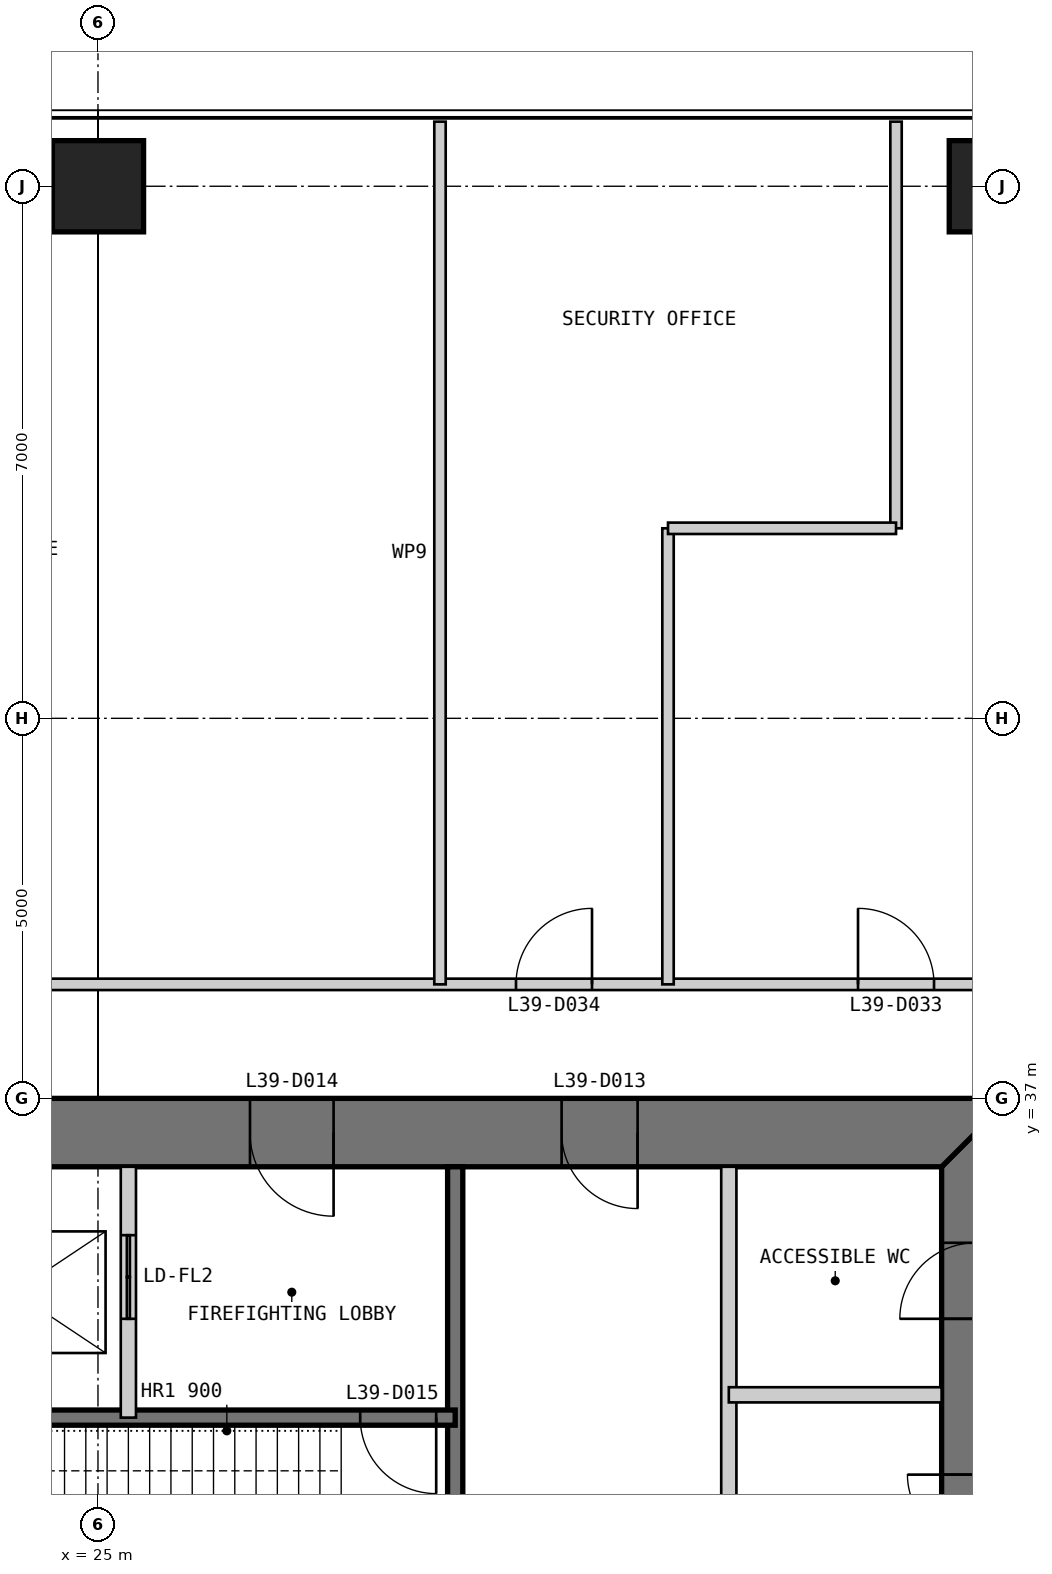
"""IFC4 building model, lengths in metres.
Left out: names, types, materials, properties, quantities, classifications, styles, units other than length and angle.
Written with IfcOpenShell. Run it as: python <this file> out.ifc"""

import sys

from ifc_helpers import new_model, si_unit, direction, frame, frame_2d, origin, origin_2d, place, context, subcontext, project, spatial, polyline, rectangle, outline, extrude, element, fill, save


model = new_model("IFC4")
c1 = context("Model", 3, precision=1e-05, world=origin(), true_north=direction((0.0, 1.0)))
c2 = subcontext(c1, "Body", "Model", "MODEL_VIEW")
j1 = project(units=[si_unit("LENGTHUNIT", "METRE"), si_unit("PLANEANGLEUNIT", "RADIAN")], contexts=[c1])
p1 = place(None, origin())
s1 = spatial("IfcSite", under=j1, at=p1, CompositionType="ELEMENT")
p2 = place(p1, origin())
s2 = spatial("IfcBuilding", under=s1, at=p2, CompositionType="ELEMENT")
p3 = place(p2, frame((0.0, 0.0, 168.4)))
s3 = spatial("IfcBuildingStorey", under=s2, at=p3, CompositionType="ELEMENT", Elevation=168.4)
p4 = place(p3, frame((37.0, 49.0, 0.0), z_axis=(0.0, 0.0, 1.0), x_axis=(1.0, 0.0, 0.0)))
e1 = element("IfcColumn", 1, at=p4, inside=s3, PredefinedType="COLUMN", context=c2, shape_type="SweptSolid", body=[
    extrude(rectangle(XDim=1.6, YDim=1.2, at=origin_2d()), origin(), (0.0, 0.0, 1.0), 5.4),
])
p5 = place(p3, frame((25.0, 49.0, 0.0), z_axis=(0.0, 0.0, 1.0), x_axis=(1.0, 0.0, 0.0)))
e2 = element("IfcColumn", 2, at=p5, inside=s3, PredefinedType="COLUMN", context=c2, shape_type="SweptSolid", body=[
    extrude(rectangle(XDim=1.2, YDim=1.2, at=origin_2d()), origin(), (0.0, 0.0, 1.0), 5.4),
])
p6 = place(p3, frame((36.55, 13.9, 0.0), z_axis=(0.0, 0.0, 1.0), x_axis=(0.0, 1.0, 0.0)))
e3 = element("IfcWall", 3, at=p6, inside=s3, PredefinedType="SHEAR", context=c2, shape_type="SweptSolid", body=[
    extrude(outline(polyline([(-0.9, -0.45), (23.1, -0.45), (22.2, 0.45), (0.0, 0.45), (-0.9, -0.45)])), origin(), (0.0, 0.0, 1.0), 5.4),
])
p7 = place(p6, frame((20.2, 0.0, 0.0)))
e4 = element("IfcOpeningElement", 4, at=p7, cuts=e3, PredefinedType="OPENING", context=c2, shape_type="SweptSolid", body=[
    extrude(rectangle(XDim=1.0, YDim=2.2, at=frame_2d((0.5, 1.1))), frame((0.0, 0.46, 0.0), z_axis=(0.0, -1.0, 0.0), x_axis=(1.0, 0.0, 0.0)), (0.0, 0.0, 1.0), 0.92),
])
p8 = place(p6, frame((17.25, 0.0, 0.0)))
e5 = element("IfcOpeningElement", 5, at=p8, cuts=e3, PredefinedType="OPENING", context=c2, shape_type="SweptSolid", body=[
    extrude(rectangle(XDim=0.9, YDim=2.2, at=frame_2d((0.45, 1.1))), frame((0.0, 0.46, 0.0), z_axis=(0.0, -1.0, 0.0), x_axis=(1.0, 0.0, 0.0)), (0.0, 0.0, 1.0), 0.92),
])
p9 = place(p3, frame((37.0, 36.55, 0.0), z_axis=(0.0, 0.0, 1.0), x_axis=(-1.0, 0.0, 0.0)))
e6 = element("IfcWall", 6, at=p9, inside=s3, PredefinedType="SHEAR", context=c2, shape_type="SweptSolid", body=[
    extrude(outline(polyline([(0.0, -0.45), (24.0, -0.45), (23.1, 0.45), (0.9, 0.45), (0.0, -0.45)])), origin(), (0.0, 0.0, 1.0), 5.4),
])
p10 = place(p9, frame((4.9, 0.0, 0.0)))
e7 = element("IfcOpeningElement", 7, at=p10, cuts=e6, PredefinedType="OPENING", context=c2, shape_type="SweptSolid", body=[
    extrude(rectangle(XDim=1.0, YDim=2.2, at=frame_2d((0.5, 1.1))), frame((0.0, 0.46, 0.0), z_axis=(0.0, -1.0, 0.0), x_axis=(1.0, 0.0, 0.0)), (0.0, 0.0, 1.0), 0.92),
])
p11 = place(p9, frame((8.9, 0.0, 0.0)))
e8 = element("IfcOpeningElement", 8, at=p11, cuts=e6, PredefinedType="OPENING", context=c2, shape_type="SweptSolid", body=[
    extrude(rectangle(XDim=1.1, YDim=2.2, at=frame_2d((0.55, 1.1))), frame((0.0, 0.46, 0.0), z_axis=(0.0, -1.0, 0.0), x_axis=(1.0, 0.0, 0.0)), (0.0, 0.0, 1.0), 0.92),
])
p12 = place(p9, frame((15.05, 0.0, 0.0)))
e9 = element("IfcOpeningElement", 9, at=p12, cuts=e6, PredefinedType="OPENING", context=c2, shape_type="SweptSolid", body=[
    extrude(rectangle(XDim=0.9, YDim=2.2, at=frame_2d((0.45, 1.1))), frame((0.0, 0.46, 0.0), z_axis=(0.0, -1.0, 0.0), x_axis=(1.0, 0.0, 0.0)), (0.0, 0.0, 1.0), 0.92),
])
p13 = place(p9, frame((17.9, 0.0, 0.0)))
e10 = element("IfcOpeningElement", 10, at=p13, cuts=e6, PredefinedType="OPENING", context=c2, shape_type="SweptSolid", body=[
    extrude(rectangle(XDim=1.0, YDim=2.2, at=frame_2d((0.5, 1.1))), frame((0.0, 0.46, 0.0), z_axis=(0.0, -1.0, 0.0), x_axis=(1.0, 0.0, 0.0)), (0.0, 0.0, 1.0), 0.92),
])
p14 = place(p9, frame((21.4, 0.0, 0.0)))
e11 = element("IfcOpeningElement", 11, at=p14, cuts=e6, PredefinedType="OPENING", context=c2, shape_type="SweptSolid", body=[
    extrude(rectangle(XDim=1.0, YDim=2.2, at=frame_2d((0.5, 1.1))), frame((0.0, 0.46, 0.0), z_axis=(0.0, -1.0, 0.0), x_axis=(1.0, 0.0, 0.0)), (0.0, 0.0, 1.0), 0.92),
])
p15 = place(p3, frame((33.3, 36.1, 0.0), z_axis=(0.0, 0.0, 1.0), x_axis=(0.0, -1.0, 0.0)))
e12 = element("IfcWall", 12, at=p15, inside=s3, PredefinedType="PARTITIONING", context=c2, shape_type="SweptSolid", body=[
    extrude(rectangle(XDim=16.1, YDim=0.2, at=frame_2d((8.05, 0.0))), origin(), (0.0, 0.0, 1.0), 5.2),
])
p16 = place(p3, frame((29.7, 36.1, 0.0), z_axis=(0.0, 0.0, 1.0), x_axis=(0.0, -1.0, 0.0)))
e13 = element("IfcWall", 13, at=p16, inside=s3, PredefinedType="SOLIDWALL", context=c2, shape_type="SweptSolid", body=[
    extrude(rectangle(XDim=16.1, YDim=0.2, at=frame_2d((8.05, 0.0))), origin(), (0.0, 0.0, 1.0), 5.2),
])
p17 = place(p16, frame((7.217, 0.0, 0.0)))
e14 = element("IfcOpeningElement", 14, at=p17, cuts=e13, PredefinedType="OPENING", context=c2, shape_type="SweptSolid", body=[
    extrude(rectangle(XDim=1.1, YDim=2.2, at=frame_2d((0.55, 1.1))), frame((0.0, 0.11, 0.0), z_axis=(0.0, -1.0, 0.0), x_axis=(1.0, 0.0, 0.0)), (0.0, 0.0, 1.0), 0.22),
])
p18 = place(p16, frame((10.55, 0.0, 0.0)))
e15 = element("IfcOpeningElement", 15, at=p18, cuts=e13, PredefinedType="OPENING", context=c2, shape_type="SweptSolid", body=[
    extrude(rectangle(XDim=1.1, YDim=2.2, at=frame_2d((0.55, 1.1))), frame((0.0, 0.11, 0.0), z_axis=(0.0, -1.0, 0.0), x_axis=(1.0, 0.0, 0.0)), (0.0, 0.0, 1.0), 0.22),
])
p19 = place(p16, frame((13.883, 0.0, 0.0)))
e16 = element("IfcOpeningElement", 16, at=p19, cuts=e13, PredefinedType="OPENING", context=c2, shape_type="SweptSolid", body=[
    extrude(rectangle(XDim=1.1, YDim=2.2, at=frame_2d((0.55, 1.1))), frame((0.0, 0.11, 0.0), z_axis=(0.0, -1.0, 0.0), x_axis=(1.0, 0.0, 0.0)), (0.0, 0.0, 1.0), 0.22),
])
p20 = place(p3, frame((29.7, 32.8, 0.0), z_axis=(0.0, 0.0, 1.0), x_axis=(-1.0, 0.0, 0.0)))
e17 = element("IfcWall", 17, at=p20, inside=s3, PredefinedType="SOLIDWALL", context=c2, shape_type="SweptSolid", body=[
    extrude(rectangle(XDim=9.4, YDim=0.2, at=frame_2d((4.7, 0.0))), origin(), (0.0, 0.0, 1.0), 5.2),
])
p21 = place(p20, frame((0.25, 0.0, 0.0)))
e18 = element("IfcOpeningElement", 18, at=p21, cuts=e17, PredefinedType="OPENING", context=c2, shape_type="SweptSolid", body=[
    extrude(rectangle(XDim=1.0, YDim=2.2, at=frame_2d((0.5, 1.1))), frame((0.0, 0.11, 0.0), z_axis=(0.0, -1.0, 0.0), x_axis=(1.0, 0.0, 0.0)), (0.0, 0.0, 1.0), 0.22),
])
p22 = place(p3, frame((25.4, 36.1, 0.0), z_axis=(0.0, 0.0, 1.0), x_axis=(0.0, -1.0, 0.0)))
e19 = element("IfcWall", 19, at=p22, inside=s3, PredefinedType="PARTITIONING", context=c2, shape_type="SweptSolid", body=[
    extrude(rectangle(XDim=3.3, YDim=0.2, at=frame_2d((1.65, 0.0))), origin(), (0.0, 0.0, 1.0), 5.2),
])
p23 = place(p22, frame((0.9, 0.0, 0.0)))
e20 = element("IfcOpeningElement", 20, at=p23, cuts=e19, PredefinedType="OPENING", context=c2, shape_type="SweptSolid", body=[
    extrude(rectangle(XDim=1.1, YDim=2.2, at=frame_2d((0.55, 1.1))), frame((0.0, 0.11, 0.0), z_axis=(0.0, -1.0, 0.0), x_axis=(1.0, 0.0, 0.0)), (0.0, 0.0, 1.0), 0.22),
])
p24 = place(p3, frame((36.1, 33.1, 0.0), z_axis=(0.0, 0.0, 1.0), x_axis=(-1.0, 0.0, 0.0)))
e21 = element("IfcWall", 21, at=p24, inside=s3, PredefinedType="PARTITIONING", context=c2, shape_type="SweptSolid", body=[
    extrude(rectangle(XDim=2.8, YDim=0.2, at=frame_2d((1.4, 0.0))), origin(), (0.0, 0.0, 1.0), 5.2),
])
p25 = place(p3, frame((38.5, 38.5, 0.0), z_axis=(0.0, 0.0, 1.0), x_axis=(-1.0, 0.0, 0.0)))
e22 = element("IfcWall", 22, at=p25, inside=s3, PredefinedType="PARTITIONING", context=c2, shape_type="SweptSolid", body=[
    extrude(rectangle(XDim=27.0, YDim=0.15, at=frame_2d((13.5, 0.0))), origin(), (0.0, 0.0, 1.0), 5.25),
])
p26 = place(p25, frame((2.5, 0.0, 0.0)))
e23 = element("IfcOpeningElement", 23, at=p26, cuts=e22, PredefinedType="OPENING", context=c2, shape_type="SweptSolid", body=[
    extrude(rectangle(XDim=1.0, YDim=2.2, at=frame_2d((0.5, 1.1))), frame((0.0, 0.085, 0.0), z_axis=(0.0, -1.0, 0.0), x_axis=(1.0, 0.0, 0.0)), (0.0, 0.0, 1.0), 0.17),
])
p27 = place(p25, frame((7.0, 0.0, 0.0)))
e24 = element("IfcOpeningElement", 24, at=p27, cuts=e22, PredefinedType="OPENING", context=c2, shape_type="SweptSolid", body=[
    extrude(rectangle(XDim=1.0, YDim=2.2, at=frame_2d((0.5, 1.1))), frame((0.0, 0.085, 0.0), z_axis=(0.0, -1.0, 0.0), x_axis=(1.0, 0.0, 0.0)), (0.0, 0.0, 1.0), 0.17),
])
p28 = place(p25, frame((14.5, 0.0, 0.0)))
e25 = element("IfcOpeningElement", 25, at=p28, cuts=e22, PredefinedType="OPENING", context=c2, shape_type="SweptSolid", body=[
    extrude(rectangle(XDim=1.0, YDim=2.2, at=frame_2d((0.5, 1.1))), frame((0.0, 0.085, 0.0), z_axis=(0.0, -1.0, 0.0), x_axis=(1.0, 0.0, 0.0)), (0.0, 0.0, 1.0), 0.17),
])
p29 = place(p3, frame((35.5, 49.85, 0.0), z_axis=(0.0, 0.0, 1.0), x_axis=(0.0, -1.0, 0.0)))
e26 = element("IfcWall", 26, at=p29, inside=s3, PredefinedType="PARTITIONING", context=c2, shape_type="SweptSolid", body=[
    extrude(rectangle(XDim=5.35, YDim=0.15, at=frame_2d((2.675, 0.0))), origin(), (0.0, 0.0, 1.0), 5.25),
])
p30 = place(p3, frame((32.5, 44.5, 0.0), z_axis=(0.0, 0.0, 1.0), x_axis=(0.0, -1.0, 0.0)))
e27 = element("IfcWall", 27, at=p30, inside=s3, PredefinedType="PARTITIONING", context=c2, shape_type="SweptSolid", body=[
    extrude(rectangle(XDim=6.0, YDim=0.15, at=frame_2d((3.0, 0.0))), origin(), (0.0, 0.0, 1.0), 5.25),
])
p31 = place(p3, frame((29.5, 49.85, 0.0), z_axis=(0.0, 0.0, 1.0), x_axis=(0.0, -1.0, 0.0)))
e28 = element("IfcWall", 28, at=p31, inside=s3, PredefinedType="PARTITIONING", context=c2, shape_type="SweptSolid", body=[
    extrude(rectangle(XDim=11.35, YDim=0.15, at=frame_2d((5.675, 0.0))), origin(), (0.0, 0.0, 1.0), 5.25),
])
p32 = place(p3, frame((35.5, 44.5, 0.0), z_axis=(0.0, 0.0, 1.0), x_axis=(-1.0, 0.0, 0.0)))
e29 = element("IfcWall", 29, at=p32, inside=s3, PredefinedType="PARTITIONING", context=c2, shape_type="SweptSolid", body=[
    extrude(rectangle(XDim=3.0, YDim=0.15, at=frame_2d((1.5, 0.0))), origin(), (0.0, 0.0, 1.0), 5.25),
])
p33 = place(p10, origin())
e30 = element("IfcDoor", 30, at=p33, inside=s3, OperationType="SINGLE_SWING_LEFT", PredefinedType="DOOR", context=c2, shape_type="SweptSolid", body=[
    extrude(rectangle(XDim=1.0, YDim=2.2, at=frame_2d((0.5, 1.1))), frame((0.0, 0.025, 0.0), z_axis=(0.0, -1.0, 0.0), x_axis=(1.0, 0.0, 0.0)), (0.0, 0.0, 1.0), 0.05),
    extrude(outline(polyline([(0.0, 0.0), (0.04, 0.0), (0.04, 2.16), (0.96, 2.16), (0.96, 0.0), (1.0, 0.0), (1.0, 2.2), (0.0, 2.2), (0.0, 0.0)])), frame((0.0, 0.3, 0.0), z_axis=(0.0, -1.0, 0.0), x_axis=(1.0, 0.0, 0.0)), (0.0, 0.0, 1.0), 0.6),
])
fill(e7, e30)
p34 = place(p11, origin())
e31 = element("IfcDoor", 31, at=p34, inside=s3, OperationType="SINGLE_SWING_LEFT", PredefinedType="DOOR", context=c2, shape_type="SweptSolid", body=[
    extrude(rectangle(XDim=1.1, YDim=2.2, at=frame_2d((0.55, 1.1))), frame((0.0, 0.025, 0.0), z_axis=(0.0, -1.0, 0.0), x_axis=(1.0, 0.0, 0.0)), (0.0, 0.0, 1.0), 0.05),
    extrude(outline(polyline([(0.0, 0.0), (0.04, 0.0), (0.04, 2.16), (1.06, 2.16), (1.06, 0.0), (1.1, 0.0), (1.1, 2.2), (0.0, 2.2), (0.0, 0.0)])), frame((0.0, 0.3, 0.0), z_axis=(0.0, -1.0, 0.0), x_axis=(1.0, 0.0, 0.0)), (0.0, 0.0, 1.0), 0.6),
])
fill(e8, e31)
p35 = place(p21, origin())
e32 = element("IfcDoor", 32, at=p35, inside=s3, OperationType="SINGLE_SWING_LEFT", PredefinedType="DOOR", context=c2, shape_type="SweptSolid", body=[
    extrude(rectangle(XDim=1.0, YDim=2.2, at=frame_2d((0.5, 1.1))), frame((0.0, 0.025, 0.0), z_axis=(0.0, -1.0, 0.0), x_axis=(1.0, 0.0, 0.0)), (0.0, 0.0, 1.0), 0.05),
])
fill(e18, e32)
p36 = place(p7, origin())
e33 = element("IfcDoor", 33, at=p36, inside=s3, OperationType="SINGLE_SWING_LEFT", PredefinedType="DOOR", context=c2, shape_type="SweptSolid", body=[
    extrude(rectangle(XDim=1.0, YDim=2.2, at=frame_2d((0.5, 1.1))), frame((0.0, 0.025, 0.0), z_axis=(0.0, -1.0, 0.0), x_axis=(1.0, 0.0, 0.0)), (0.0, 0.0, 1.0), 0.05),
    extrude(outline(polyline([(0.0, 0.0), (0.04, 0.0), (0.04, 2.16), (0.96, 2.16), (0.96, 0.0), (1.0, 0.0), (1.0, 2.2), (0.0, 2.2), (0.0, 0.0)])), frame((0.0, 0.3, 0.0), z_axis=(0.0, -1.0, 0.0), x_axis=(1.0, 0.0, 0.0)), (0.0, 0.0, 1.0), 0.6),
])
fill(e4, e33)
p37 = place(p8, origin())
e34 = element("IfcDoor", 34, at=p37, inside=s3, OperationType="SINGLE_SWING_RIGHT", PredefinedType="DOOR", context=c2, shape_type="SweptSolid", body=[
    extrude(rectangle(XDim=0.9, YDim=2.2, at=frame_2d((0.45, 1.1))), frame((0.0, 0.025, 0.0), z_axis=(0.0, -1.0, 0.0), x_axis=(1.0, 0.0, 0.0)), (0.0, 0.0, 1.0), 0.05),
    extrude(outline(polyline([(0.0, 0.0), (0.04, 0.0), (0.04, 2.16), (0.86, 2.16), (0.86, 0.0), (0.9, 0.0), (0.9, 2.2), (0.0, 2.2), (0.0, 0.0)])), frame((0.0, 0.3, 0.0), z_axis=(0.0, -1.0, 0.0), x_axis=(1.0, 0.0, 0.0)), (0.0, 0.0, 1.0), 0.6),
])
fill(e5, e34)
p38 = place(p26, frame((1.0, 0.0, 0.0), z_axis=(0.0, 0.0, 1.0), x_axis=(-1.0, 0.0, 0.0)))
e35 = element("IfcDoor", 35, at=p38, inside=s3, OperationType="SINGLE_SWING_LEFT", PredefinedType="DOOR", context=c2, shape_type="SweptSolid", body=[
    extrude(rectangle(XDim=1.0, YDim=2.2, at=frame_2d((0.5, 1.1))), frame((0.0, 0.025, 0.0), z_axis=(0.0, -1.0, 0.0), x_axis=(1.0, 0.0, 0.0)), (0.0, 0.0, 1.0), 0.05),
])
fill(e23, e35)
p39 = place(p27, frame((1.0, 0.0, 0.0), z_axis=(0.0, 0.0, 1.0), x_axis=(-1.0, 0.0, 0.0)))
e36 = element("IfcDoor", 36, at=p39, inside=s3, OperationType="SINGLE_SWING_RIGHT", PredefinedType="DOOR", context=c2, shape_type="SweptSolid", body=[
    extrude(rectangle(XDim=1.0, YDim=2.2, at=frame_2d((0.5, 1.1))), frame((0.0, 0.025, 0.0), z_axis=(0.0, -1.0, 0.0), x_axis=(1.0, 0.0, 0.0)), (0.0, 0.0, 1.0), 0.05),
])
fill(e24, e36)
p40 = place(p23, origin())
e37 = element("IfcDoor", 37, at=p40, inside=s3, OperationType="DOUBLE_DOOR_SLIDING", PredefinedType="DOOR", context=c2, shape_type="SweptSolid", body=[
    extrude(rectangle(XDim=1.1, YDim=2.2, at=frame_2d((0.55, 1.1))), frame((0.0, 0.025, 0.0), z_axis=(0.0, -1.0, 0.0), x_axis=(1.0, 0.0, 0.0)), (0.0, 0.0, 1.0), 0.05),
])
fill(e20, e37)
save(model, sys.argv[1])
